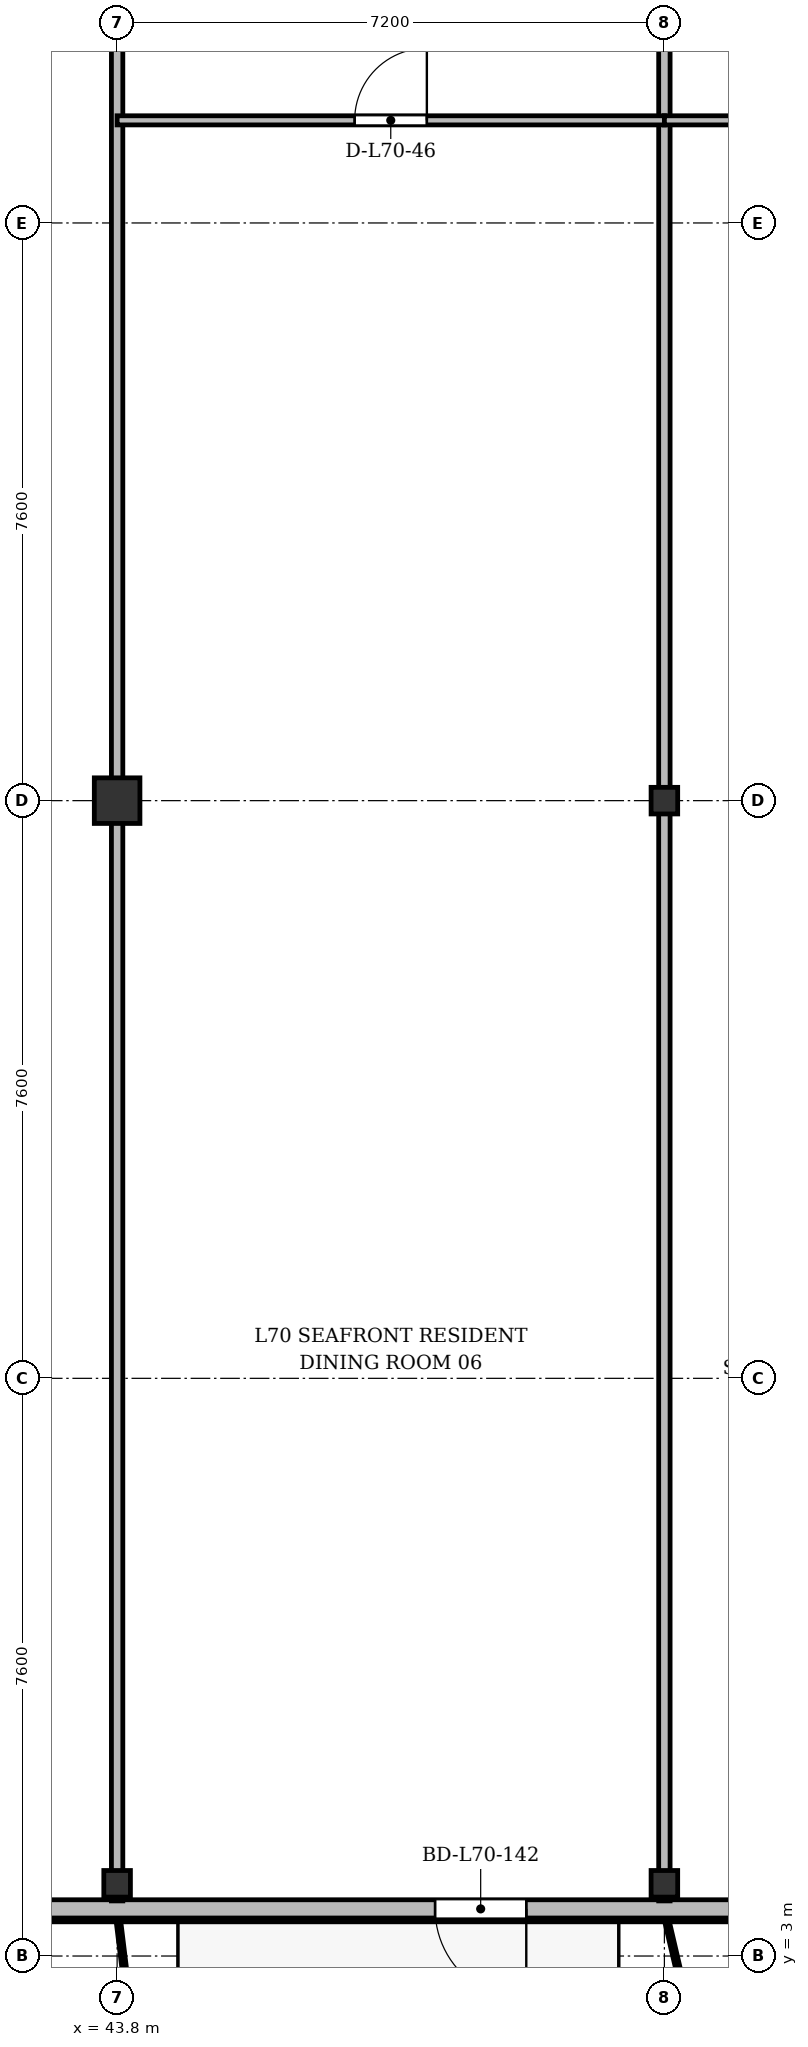
"""IFC4 building model, lengths in metres.
Left out: names, types, materials, properties, quantities, classifications, styles, units other than length and angle.
Written with IfcOpenShell. Run it as: python <this file> out.ifc"""

import sys

from ifc_helpers import new_model, si_unit, direction, frame, frame_2d, origin, origin_2d, place, context, subcontext, project, spatial, rectangle, i_section, extrude, source, transform, mapped, element, fill, save


model = new_model("IFC4")
c1 = context("Model", 3, precision=1e-05, world=origin(), true_north=direction((0.0, 1.0)))
c2 = subcontext(c1, "Body", "Model", "MODEL_VIEW")
j1 = project(units=[si_unit("LENGTHUNIT", "METRE"), si_unit("PLANEANGLEUNIT", "RADIAN")], contexts=[c1])
p1 = place(None, origin())
s1 = spatial("IfcSite", under=j1, at=p1, CompositionType="ELEMENT")
p2 = place(p1, origin())
s2 = spatial("IfcBuilding", under=s1, at=p2, CompositionType="ELEMENT")
p3 = place(p2, frame((0.0, 0.0, 270.3)))
s3 = spatial("IfcBuildingStorey", under=s2, at=p3, CompositionType="ELEMENT", Elevation=270.3)
m1 = source(origin(), c2, "Body", "SweptSolid", [
    extrude(i_section(OverallWidth=0.35, OverallDepth=0.35, WebThickness=0.018, FlangeThickness=0.028, at=origin_2d()), origin(), (0.0, 0.0, 1.0), 3.6),
])
p4 = place(p3, frame((43.8, 3.95, 0.0), z_axis=(0.0, 0.0, 1.0), x_axis=(1.0, 0.0, 0.0)))
e1 = element("IfcColumn", 1, at=p4, inside=s3, PredefinedType="COLUMN", context=c2, shape_type="MappedRepresentation", body=[
    mapped(m1, transform((0.0, 0.0, 0.0), x_axis=(1.0, 0.0, 0.0), y_axis=(0.0, 1.0, 0.0), z_axis=(0.0, 0.0, 1.0), scale=1.0)),
])
m2 = source(origin(), c2, "Body", "SweptSolid", [
    extrude(rectangle(XDim=0.6, YDim=0.6, at=origin_2d()), origin(), (0.0, 0.0, 1.0), 3.6),
])
p5 = place(p3, frame((43.8, 18.2, 0.0), z_axis=(0.0, 0.0, 1.0), x_axis=(1.0, 0.0, 0.0)))
e2 = element("IfcColumn", 2, at=p5, inside=s3, PredefinedType="COLUMN", context=c2, shape_type="MappedRepresentation", body=[
    mapped(m2, transform((0.0, 0.0, 0.0), x_axis=(1.0, 0.0, 0.0), y_axis=(0.0, 1.0, 0.0), z_axis=(0.0, 0.0, 1.0), scale=1.0)),
])
for number, where, z_axis, x_axis in (
    (3, (51.0, 3.95, 0.0), (0.0, 0.0, 1.0), (1.0, 0.0, 0.0)),
    (4, (51.0, 18.2, 0.0), (0.0, 0.0, 1.0), (1.0, 0.0, 0.0)),
):
    element("IfcColumn", number, at=place(p3, frame(where, z_axis=z_axis, x_axis=x_axis)), inside=s3, PredefinedType="COLUMN", context=c2, shape_type="MappedRepresentation", body=[
        mapped(m1, transform((0.0, 0.0, 0.0), x_axis=(1.0, 0.0, 0.0), y_axis=(0.0, 1.0, 0.0), z_axis=(0.0, 0.0, 1.0), scale=1.0)),
    ])
p6 = place(p3, frame((63.2, 3.62, 0.0), z_axis=(0.0, 0.0, 1.0), x_axis=(-1.0, 0.0, 0.0)))
e5 = element("IfcWall", 5, at=p6, inside=s3, PredefinedType="SOLIDWALL", context=c2, shape_type="SweptSolid", body=[
    extrude(rectangle(XDim=52.0, YDim=0.24, at=frame_2d((26.0, 0.0))), origin(), (0.0, 0.0, 1.0), 3.37),
])
p7 = place(p6, frame((1.345, 0.0, 0.9)))
e6 = element("IfcOpeningElement", 6, at=p7, cuts=e5, PredefinedType="OPENING", context=c2, shape_type="SweptSolid", body=[
    extrude(rectangle(XDim=1.8, YDim=1.8, at=frame_2d((0.9, 0.9))), frame((0.0, 0.13, 0.0), z_axis=(0.0, -1.0, 0.0), x_axis=(1.0, 0.0, 0.0)), (0.0, 0.0, 1.0), 0.26),
])
p8 = place(p6, frame((5.1, 0.0, 0.9)))
e7 = element("IfcOpeningElement", 7, at=p8, cuts=e5, PredefinedType="OPENING", context=c2, shape_type="SweptSolid", body=[
    extrude(rectangle(XDim=2.2, YDim=1.8, at=frame_2d((1.1, 0.9))), frame((0.0, 0.13, 0.0), z_axis=(0.0, -1.0, 0.0), x_axis=(1.0, 0.0, 0.0)), (0.0, 0.0, 1.0), 0.26),
])
p9 = place(p6, frame((9.35, 0.0, 0.9)))
e8 = element("IfcOpeningElement", 8, at=p9, cuts=e5, PredefinedType="OPENING", context=c2, shape_type="SweptSolid", body=[
    extrude(rectangle(XDim=1.5, YDim=1.75, at=frame_2d((0.75, 0.875))), frame((0.0, 0.13, 0.0), z_axis=(0.0, -1.0, 0.0), x_axis=(1.0, 0.0, 0.0)), (0.0, 0.0, 1.0), 0.26),
])
p10 = place(p6, frame((14.017, 0.0, 0.0)))
e9 = element("IfcOpeningElement", 9, at=p10, cuts=e5, PredefinedType="OPENING", context=c2, shape_type="SweptSolid", body=[
    extrude(rectangle(XDim=1.2, YDim=2.2, at=frame_2d((0.6, 1.1))), frame((0.0, 0.13, 0.0), z_axis=(0.0, -1.0, 0.0), x_axis=(1.0, 0.0, 0.0)), (0.0, 0.0, 1.0), 0.26),
])
p11 = place(p6, frame((25.175, 0.0, 0.9)))
e10 = element("IfcOpeningElement", 10, at=p11, cuts=e5, PredefinedType="OPENING", context=c2, shape_type="SweptSolid", body=[
    extrude(rectangle(XDim=1.65, YDim=1.85, at=frame_2d((0.825, 0.925))), frame((0.0, 0.13, 0.0), z_axis=(0.0, -1.0, 0.0), x_axis=(1.0, 0.0, 0.0)), (0.0, 0.0, 1.0), 0.26),
])
p12 = place(p6, frame((33.01, 0.0, 0.9)))
e11 = element("IfcOpeningElement", 11, at=p12, cuts=e5, PredefinedType="OPENING", context=c2, shape_type="SweptSolid", body=[
    extrude(rectangle(XDim=1.8, YDim=1.8, at=frame_2d((0.9, 0.9))), frame((0.0, 0.13, 0.0), z_axis=(0.0, -1.0, 0.0), x_axis=(1.0, 0.0, 0.0)), (0.0, 0.0, 1.0), 0.26),
])
p13 = place(p6, frame((35.45, 0.0, 0.9)))
e12 = element("IfcOpeningElement", 12, at=p13, cuts=e5, PredefinedType="OPENING", context=c2, shape_type="SweptSolid", body=[
    extrude(rectangle(XDim=1.5, YDim=1.75, at=frame_2d((0.75, 0.875))), frame((0.0, 0.13, 0.0), z_axis=(0.0, -1.0, 0.0), x_axis=(1.0, 0.0, 0.0)), (0.0, 0.0, 1.0), 0.26),
])
p14 = place(p6, frame((37.85, 0.0, 0.9)))
e13 = element("IfcOpeningElement", 13, at=p14, cuts=e5, PredefinedType="OPENING", context=c2, shape_type="SweptSolid", body=[
    extrude(rectangle(XDim=1.5, YDim=1.75, at=frame_2d((0.75, 0.875))), frame((0.0, 0.13, 0.0), z_axis=(0.0, -1.0, 0.0), x_axis=(1.0, 0.0, 0.0)), (0.0, 0.0, 1.0), 0.26),
])
p15 = place(p6, frame((41.452, 0.0, 0.0)))
e14 = element("IfcOpeningElement", 14, at=p15, cuts=e5, PredefinedType="OPENING", context=c2, shape_type="SweptSolid", body=[
    extrude(rectangle(XDim=1.2, YDim=2.2, at=frame_2d((0.6, 1.1))), frame((0.0, 0.13, 0.0), z_axis=(0.0, -1.0, 0.0), x_axis=(1.0, 0.0, 0.0)), (0.0, 0.0, 1.0), 0.26),
])
p16 = place(p6, frame((44.575, 0.0, 0.9)))
e15 = element("IfcOpeningElement", 15, at=p16, cuts=e5, PredefinedType="OPENING", context=c2, shape_type="SweptSolid", body=[
    extrude(rectangle(XDim=1.65, YDim=1.85, at=frame_2d((0.825, 0.925))), frame((0.0, 0.13, 0.0), z_axis=(0.0, -1.0, 0.0), x_axis=(1.0, 0.0, 0.0)), (0.0, 0.0, 1.0), 0.26),
])
p17 = place(p6, frame((48.855, 0.0, 0.9)))
e16 = element("IfcOpeningElement", 16, at=p17, cuts=e5, PredefinedType="OPENING", context=c2, shape_type="SweptSolid", body=[
    extrude(rectangle(XDim=1.8, YDim=1.8, at=frame_2d((0.9, 0.9))), frame((0.0, 0.13, 0.0), z_axis=(0.0, -1.0, 0.0), x_axis=(1.0, 0.0, 0.0)), (0.0, 0.0, 1.0), 0.26),
])
for number, where, z_axis, x_axis in (
    (17, (43.8, 3.725, 0.0), (0.0, 0.0, 1.0), (0.0, 1.0, 0.0)),
    (18, (51.0, 3.725, 0.0), (0.0, 0.0, 1.0), (0.0, 1.0, 0.0)),
):
    element("IfcWall", number, at=place(p3, frame(where, z_axis=z_axis, x_axis=x_axis)), inside=s3, PredefinedType="PARTITIONING", context=c2, shape_type="SweptSolid", body=[
        extrude(rectangle(XDim=27.275, YDim=0.15, at=frame_2d((13.637, 0.0))), origin(), (0.0, 0.0, 1.0), 2.87),
    ])
p18 = place(p3, frame((43.8, 27.15, 0.0), z_axis=(0.0, 0.0, 1.0), x_axis=(1.0, 0.0, 0.0)))
e19 = element("IfcWall", 19, at=p18, inside=s3, PredefinedType="PARTITIONING", context=c2, shape_type="SweptSolid", body=[
    extrude(rectangle(XDim=7.2, YDim=0.12, at=frame_2d((3.6, 0.0))), origin(), (0.0, 0.0, 1.0), 2.87),
])
p19 = place(p18, frame((3.125, 0.0, 0.0)))
e20 = element("IfcOpeningElement", 20, at=p19, cuts=e19, PredefinedType="OPENING", context=c2, shape_type="SweptSolid", body=[
    extrude(rectangle(XDim=0.95, YDim=2.15, at=frame_2d((0.475, 1.075))), frame((0.0, 0.07, 0.0), z_axis=(0.0, -1.0, 0.0), x_axis=(1.0, 0.0, 0.0)), (0.0, 0.0, 1.0), 0.14),
])
p20 = place(p3, frame((51.0, 27.15, 0.0), z_axis=(0.0, 0.0, 1.0), x_axis=(1.0, 0.0, 0.0)))
e21 = element("IfcWall", 21, at=p20, inside=s3, PredefinedType="PARTITIONING", context=c2, shape_type="SweptSolid", body=[
    extrude(rectangle(XDim=4.2, YDim=0.12, at=frame_2d((2.1, 0.0))), origin(), (0.0, 0.0, 1.0), 2.87),
])
p21 = place(p20, frame((1.529, 0.0, 0.0)))
e22 = element("IfcOpeningElement", 22, at=p21, cuts=e21, PredefinedType="OPENING", context=c2, shape_type="SweptSolid", body=[
    extrude(rectangle(XDim=0.95, YDim=2.15, at=frame_2d((0.475, 1.075))), frame((0.0, 0.07, 0.0), z_axis=(0.0, -1.0, 0.0), x_axis=(1.0, 0.0, 0.0)), (0.0, 0.0, 1.0), 0.14),
])
m3 = source(origin(), c2, "Body", "SweptSolid", [
    extrude(rectangle(XDim=1.2, YDim=2.2, at=frame_2d((0.6, 1.1))), frame((0.0, 0.025, 0.0), z_axis=(0.0, -1.0, 0.0), x_axis=(1.0, 0.0, 0.0)), (0.0, 0.0, 1.0), 0.05),
])
p22 = place(p10, origin())
e23 = element("IfcDoor", 23, at=p22, inside=s3, OperationType="SINGLE_SWING_LEFT", PredefinedType="DOOR", context=c2, shape_type="MappedRepresentation", body=[
    mapped(m3, transform((0.0, 0.0, 0.0), x_axis=(1.0, 0.0, 0.0), y_axis=(0.0, 1.0, 0.0), z_axis=(0.0, 0.0, 1.0), scale=1.0)),
])
fill(e9, e23)
m4 = source(origin(), c2, "Body", "SweptSolid", [
    extrude(rectangle(XDim=0.95, YDim=2.15, at=frame_2d((0.475, 1.075))), frame((0.0, 0.025, 0.0), z_axis=(0.0, -1.0, 0.0), x_axis=(1.0, 0.0, 0.0)), (0.0, 0.0, 1.0), 0.05),
])
p23 = place(p19, origin())
e24 = element("IfcDoor", 24, at=p23, inside=s3, OperationType="SINGLE_SWING_RIGHT", PredefinedType="DOOR", context=c2, shape_type="MappedRepresentation", body=[
    mapped(m4, transform((0.0, 0.0, 0.0), x_axis=(1.0, 0.0, 0.0), y_axis=(0.0, 1.0, 0.0), z_axis=(0.0, 0.0, 1.0), scale=1.0)),
])
fill(e20, e24)
save(model, sys.argv[1])
